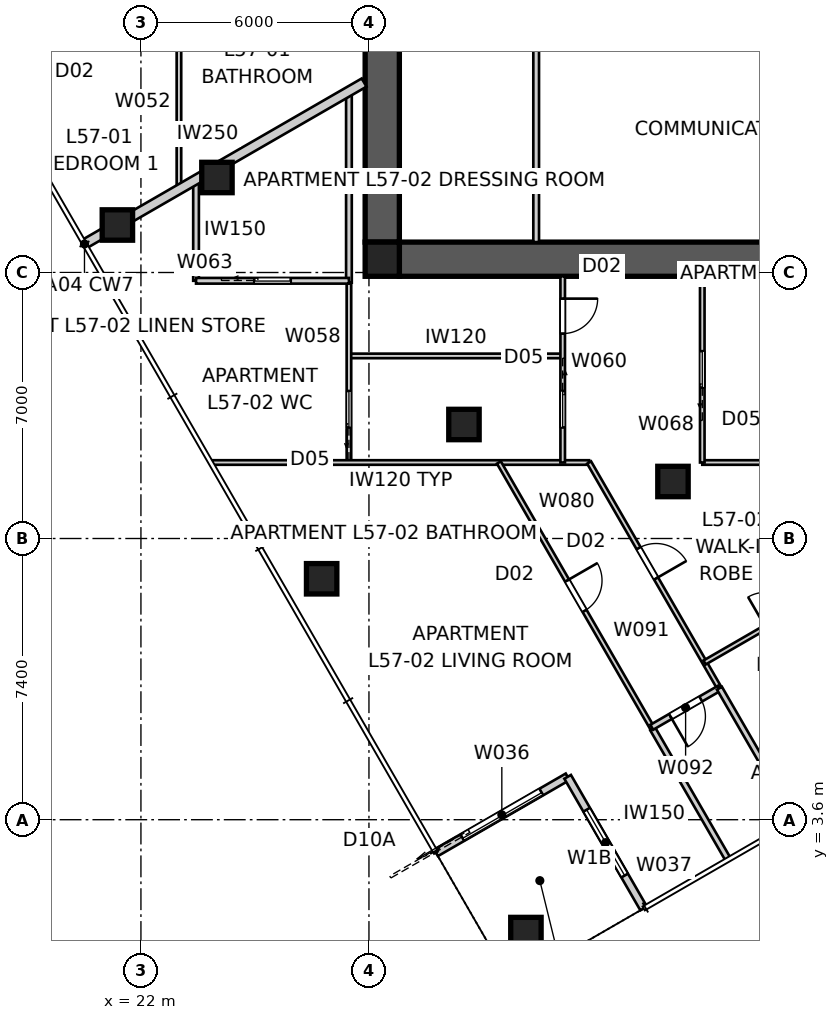
"""IFC4 building model, lengths in metres.
Left out: names, types, materials, properties, quantities, classifications, styles, units other than length and angle.
Written with IfcOpenShell. Run it as: python <this file> out.ifc"""

import sys

from ifc_helpers import new_model, si_unit, direction, frame, frame_2d, origin, origin_2d, place, context, subcontext, project, spatial, polyline, rectangle, outline, extrude, element, fill, save


model = new_model("IFC4")
c1 = context("Model", 3, precision=1e-05, world=origin(), true_north=direction((0.0, 1.0)))
c2 = subcontext(c1, "Body", "Model", "MODEL_VIEW")
j1 = project(units=[si_unit("LENGTHUNIT", "METRE"), si_unit("PLANEANGLEUNIT", "RADIAN")], contexts=[c1])
p1 = place(None, origin())
s1 = spatial("IfcSite", under=j1, at=p1, CompositionType="ELEMENT")
p2 = place(p1, origin())
s2 = spatial("IfcBuilding", under=s1, at=p2, CompositionType="ELEMENT")
p3 = place(p2, frame((0.0, 0.0, 208.2)))
s3 = spatial("IfcBuildingStorey", under=s2, at=p3, CompositionType="ELEMENT", Elevation=208.2)
p4 = place(p3, frame((51.2, 18.35, 0.0), z_axis=(0.0, 0.0, 1.0), x_axis=(-1.0, 0.0, 0.0)))
e1 = element("IfcWall", 1, at=p4, inside=s3, PredefinedType="SHEAR", context=c2, shape_type="SweptSolid", body=[
    extrude(outline(polyline([(0.0, -0.45), (22.4, -0.45), (22.4, -0.025), (22.85, -0.025), (22.85, 0.025), (22.4, 0.025), (22.4, 0.45), (0.0, 0.45), (0.0, 0.025), (-0.45, 0.025), (-0.45, -0.025), (0.0, -0.025), (0.0, -0.45)])), origin(), (0.0, 0.0, 1.0), 3.4),
])
p5 = place(p3, frame((28.35, 41.2, 0.0), z_axis=(0.0, 0.0, 1.0), x_axis=(0.0, -1.0, 0.0)))
e2 = element("IfcWall", 2, at=p5, inside=s3, PredefinedType="SHEAR", context=c2, shape_type="SweptSolid", body=[
    extrude(outline(polyline([(0.0, -0.45), (22.4, -0.45), (22.4, -0.025), (22.85, -0.025), (22.85, 0.025), (22.4, 0.025), (22.4, 0.45), (0.0, 0.45), (0.0, 0.025), (-0.45, 0.025), (-0.45, -0.025), (0.0, -0.025), (0.0, -0.45)])), origin(), (0.0, 0.0, 1.0), 3.4),
])
p6 = place(p5, frame((11.14, 0.0, 0.0)))
e3 = element("IfcOpeningElement", 3, at=p6, cuts=e2, PredefinedType="OPENING", context=c2, shape_type="SweptSolid", body=[
    extrude(rectangle(XDim=1.02, YDim=2.4, at=frame_2d((0.51, 1.2))), frame((0.0, 0.46, 0.0), z_axis=(0.0, -1.0, 0.0), x_axis=(1.0, 0.0, 0.0)), (0.0, 0.0, 1.0), 0.92),
])
p7 = place(p3, frame((28.35, 18.35, 0.0), z_axis=(0.0, 0.0, 1.0), x_axis=(1.0, 0.0, 0.0)))
e4 = element("IfcColumn", 4, at=p7, inside=s3, PredefinedType="COLUMN", context=c2, shape_type="SweptSolid", body=[
    extrude(rectangle(XDim=0.9, YDim=0.9, at=origin_2d()), origin(), (0.0, 0.0, 1.0), 3.4),
])
for number, where, z_axis, x_axis in (
    (5, (32.13, 0.63, -0.15), (0.0, 0.0, 1.0), (1.0, 0.0, 0.0)),
    (6, (21.38, 19.25, -0.15), (0.0, 0.0, 1.0), (1.0, 0.0, 0.0)),
    (7, (26.755, 9.94, -0.15), (0.0, 0.0, 1.0), (1.0, 0.0, 0.0)),
):
    element("IfcColumn", number, at=place(p3, frame(where, z_axis=z_axis, x_axis=x_axis)), inside=s3, PredefinedType="COLUMN", context=c2, shape_type="SweptSolid", body=[
        extrude(rectangle(XDim=0.8, YDim=0.8, at=origin_2d()), origin(), (0.0, 0.0, 1.0), 3.55),
    ])
for number, where, z_axis, x_axis in (
    (8, (24.0, 20.5, 0.0), (0.0, 0.0, 1.0), (1.0, 0.0, 0.0)),
    (9, (30.5, 14.0, 0.0), (0.0, 0.0, 1.0), (1.0, 0.0, 0.0)),
    (10, (36.0, 12.5, 0.0), (0.0, 0.0, 1.0), (1.0, 0.0, 0.0)),
):
    element("IfcColumn", number, at=place(p3, frame(where, z_axis=z_axis, x_axis=x_axis)), inside=s3, PredefinedType="COLUMN", context=c2, shape_type="SweptSolid", body=[
        extrude(rectangle(XDim=0.8, YDim=0.8, at=origin_2d()), origin(), (0.0, 0.0, 1.0), 3.4),
    ])
p8 = place(p3, frame((29.764, 2.729, 0.0), z_axis=(0.0, 0.0, 1.0), x_axis=(0.866026010844, 0.49999894854, 0.0)))
e11 = element("IfcWall", 11, at=p8, inside=s3, PredefinedType="SOLIDWALL", context=c2, shape_type="SweptSolid", body=[
    extrude(rectangle(XDim=4.0, YDim=0.2, at=frame_2d((2.0, 0.0))), origin(), (0.0, 0.0, 1.0), 3.25),
])
p9 = place(p8, frame((0.8, 0.0, 0.0)))
e12 = element("IfcOpeningElement", 12, at=p9, cuts=e11, PredefinedType="OPENING", context=c2, shape_type="SweptSolid", body=[
    extrude(rectangle(XDim=2.4, YDim=2.1, at=frame_2d((1.2, 1.05))), frame((0.0, 0.11, 0.0), z_axis=(0.0, -1.0, 0.0), x_axis=(1.0, 0.0, 0.0)), (0.0, 0.0, 1.0), 0.22),
])
p10 = place(p3, frame((33.229, 4.729, 0.0), z_axis=(0.0, 0.0, 1.0), x_axis=(0.49999894854, -0.866026010844, 0.0)))
e13 = element("IfcWall", 13, at=p10, inside=s3, PredefinedType="SOLIDWALL", context=c2, shape_type="SweptSolid", body=[
    extrude(rectangle(XDim=4.0, YDim=0.2, at=frame_2d((2.0, 0.0))), origin(), (0.0, 0.0, 1.0), 3.25),
])
p11 = place(p10, frame((1.0, 0.0, 0.45)))
e14 = element("IfcOpeningElement", 14, at=p11, cuts=e13, PredefinedType="OPENING", context=c2, shape_type="SweptSolid", body=[
    extrude(rectangle(XDim=2.0, YDim=1.8, at=frame_2d((1.0, 0.9))), frame((0.0, 0.11, 0.0), z_axis=(0.0, -1.0, 0.0), x_axis=(1.0, 0.0, 0.0)), (0.0, 0.0, 1.0), 0.22),
])
p12 = place(p3, frame((20.514, 18.75, 0.0), z_axis=(0.0, 0.0, 1.0), x_axis=(0.866020489494, 0.500008511703, 0.0)))
e15 = element("IfcWall", 15, at=p12, inside=s3, PredefinedType="PARTITIONING", context=c2, shape_type="SweptSolid", body=[
    extrude(rectangle(XDim=8.496, YDim=0.25, at=frame_2d((4.248, 0.0))), origin(), (0.0, 0.0, 1.0), 3.25),
])
p13 = place(p3, frame((32.4, 18.8, 0.0), z_axis=(0.0, 0.0, 1.0), x_axis=(0.0, 1.0, 0.0)))
e16 = element("IfcWall", 16, at=p13, inside=s3, PredefinedType="SOLIDWALL", context=c2, shape_type="SweptSolid", body=[
    extrude(rectangle(XDim=5.9, YDim=0.15, at=frame_2d((2.95, 0.0))), origin(), (0.0, 0.0, 1.0), 3.25),
])
p14 = place(p3, frame((23.0, 20.185, 0.0), z_axis=(0.0, 0.0, 1.0), x_axis=(0.0, 1.0, 0.0)))
e17 = element("IfcWall", 17, at=p14, inside=s3, PredefinedType="PARTITIONING", context=c2, shape_type="SweptSolid", body=[
    extrude(rectangle(XDim=17.18, YDim=0.12, at=frame_2d((8.59, 0.0))), origin(), (0.0, 0.0, 1.0), 2.55),
])
p15 = place(p14, frame((7.688, 0.0, 0.0)))
e18 = element("IfcOpeningElement", 18, at=p15, cuts=e17, PredefinedType="OPENING", context=c2, shape_type="SweptSolid", body=[
    extrude(rectangle(XDim=0.92, YDim=2.34, at=frame_2d((0.46, 1.17))), frame((0.0, 0.07, 0.0), z_axis=(0.0, -1.0, 0.0), x_axis=(1.0, 0.0, 0.0)), (0.0, 0.0, 1.0), 0.14),
])
p16 = place(p14, frame((14.371, 0.0, 0.0)))
e19 = element("IfcOpeningElement", 19, at=p16, cuts=e17, PredefinedType="OPENING", context=c2, shape_type="SweptSolid", body=[
    extrude(rectangle(XDim=0.92, YDim=2.34, at=frame_2d((0.46, 1.17))), frame((0.0, 0.07, 0.0), z_axis=(0.0, -1.0, 0.0), x_axis=(1.0, 0.0, 0.0)), (0.0, 0.0, 1.0), 0.14),
])
p17 = place(p3, frame((22.775, 25.915, 0.0), z_axis=(0.0, 0.0, 1.0), x_axis=(-0.866019274569, -0.500010615962, 0.0)))
e20 = element("IfcWall", 20, at=p17, inside=s3, PredefinedType="PARTITIONING", context=c2, shape_type="SweptSolid", body=[
    extrude(rectangle(XDim=5.5, YDim=0.12, at=frame_2d((2.75, 0.0))), origin(), (0.0, 0.0, 1.0), 3.25),
])
p18 = place(p17, frame((2.31, 0.0, 0.0)))
e21 = element("IfcOpeningElement", 21, at=p18, cuts=e20, PredefinedType="OPENING", context=c2, shape_type="SweptSolid", body=[
    extrude(rectangle(XDim=0.92, YDim=2.34, at=frame_2d((0.46, 1.17))), frame((0.0, 0.07, 0.0), z_axis=(0.0, -1.0, 0.0), x_axis=(1.0, 0.0, 0.0)), (0.0, 0.0, 1.0), 0.14),
])
p19 = place(p3, frame((27.473, 15.805, 0.0), z_axis=(0.0, 0.0, 1.0), x_axis=(1.0, 0.0, 0.0)))
e22 = element("IfcWall", 22, at=p19, inside=s3, PredefinedType="PARTITIONING", context=c2, shape_type="SweptSolid", body=[
    extrude(rectangle(XDim=5.625, YDim=0.12, at=frame_2d((2.812, 0.0))), origin(), (0.0, 0.0, 1.0), 3.25),
])
p20 = place(p3, frame((27.473, 13.0, 0.0), z_axis=(0.0, 0.0, 1.0), x_axis=(0.0, 1.0, 0.0)))
e23 = element("IfcWall", 23, at=p20, inside=s3, PredefinedType="PARTITIONING", context=c2, shape_type="SweptSolid", body=[
    extrude(rectangle(XDim=4.732, YDim=0.12, at=frame_2d((2.366, 0.0))), origin(), (0.0, 0.0, 1.0), 3.25),
])
p21 = place(p20, frame((0.922, 0.0, 0.0)))
e24 = element("IfcOpeningElement", 24, at=p21, cuts=e23, PredefinedType="OPENING", context=c2, shape_type="SweptSolid", body=[
    extrude(rectangle(XDim=0.96, YDim=2.1, at=frame_2d((0.48, 1.05))), frame((0.0, 0.07, 0.0), z_axis=(0.0, -1.0, 0.0), x_axis=(1.0, 0.0, 0.0)), (0.0, 0.0, 1.0), 0.14),
])
p22 = place(p3, frame((33.793, 13.0, 0.0), z_axis=(0.0, 0.0, 1.0), x_axis=(-1.0, 0.0, 0.0)))
e25 = element("IfcWall", 25, at=p22, inside=s3, PredefinedType="PARTITIONING", context=c2, shape_type="SweptSolid", body=[
    extrude(rectangle(XDim=9.913, YDim=0.12, at=frame_2d((4.957, 0.0))), origin(), (0.0, 0.0, 1.0), 3.25),
])
p23 = place(p3, frame((33.098, 17.9, 0.0), z_axis=(0.0, 0.0, 1.0), x_axis=(0.0, -1.0, 0.0)))
e26 = element("IfcWall", 26, at=p23, inside=s3, PredefinedType="PARTITIONING", context=c2, shape_type="SweptSolid", body=[
    extrude(rectangle(XDim=4.9, YDim=0.12, at=frame_2d((2.45, 0.0))), origin(), (0.0, 0.0, 1.0), 3.25),
])
p24 = place(p23, frame((3.018, 0.0, 0.0)))
e27 = element("IfcOpeningElement", 27, at=p24, cuts=e26, PredefinedType="OPENING", context=c2, shape_type="SweptSolid", body=[
    extrude(rectangle(XDim=0.96, YDim=2.1, at=frame_2d((0.48, 1.05))), frame((0.0, 0.07, 0.0), z_axis=(0.0, -1.0, 0.0), x_axis=(1.0, 0.0, 0.0)), (0.0, 0.0, 1.0), 0.14),
])
p25 = place(p23, frame((0.588, 0.0, 0.0)))
e28 = element("IfcOpeningElement", 28, at=p25, cuts=e26, PredefinedType="OPENING", context=c2, shape_type="SweptSolid", body=[
    extrude(rectangle(XDim=0.92, YDim=2.34, at=frame_2d((0.46, 1.17))), frame((0.0, 0.07, 0.0), z_axis=(0.0, -1.0, 0.0), x_axis=(1.0, 0.0, 0.0)), (0.0, 0.0, 1.0), 0.14),
])
p26 = place(p3, frame((27.473, 17.732, 0.0), z_axis=(0.0, 0.0, 1.0), x_axis=(0.0, 1.0, 0.0)))
e29 = element("IfcWall", 29, at=p26, inside=s3, PredefinedType="SOLIDWALL", context=c2, shape_type="SweptSolid", body=[
    extrude(rectangle(XDim=5.035, YDim=0.15, at=frame_2d((2.518, 0.0))), origin(), (0.0, 0.0, 1.0), 3.25),
])
p27 = place(p3, frame((23.45, 20.445, 0.0), z_axis=(0.0, 0.0, 1.0), x_axis=(0.0, -1.0, 0.0)))
e30 = element("IfcWall", 30, at=p27, inside=s3, PredefinedType="SOLIDWALL", context=c2, shape_type="SweptSolid", body=[
    extrude(rectangle(XDim=2.663, YDim=0.15, at=frame_2d((1.331, 0.0))), origin(), (0.0, 0.0, 1.0), 3.25),
])
p28 = place(p3, frame((23.45, 17.782, 0.0), z_axis=(0.0, 0.0, 1.0), x_axis=(1.0, 0.0, 0.0)))
e31 = element("IfcWall", 31, at=p28, inside=s3, PredefinedType="SOLIDWALL", context=c2, shape_type="SweptSolid", body=[
    extrude(rectangle(XDim=4.023, YDim=0.15, at=frame_2d((2.012, 0.0))), origin(), (0.0, 0.0, 1.0), 3.25),
])
p29 = place(p28, frame((1.532, 0.0, 0.0)))
e32 = element("IfcOpeningElement", 32, at=p29, cuts=e31, PredefinedType="OPENING", context=c2, shape_type="SweptSolid", body=[
    extrude(rectangle(XDim=0.96, YDim=2.1, at=frame_2d((0.48, 1.05))), frame((0.0, 0.085, 0.0), z_axis=(0.0, -1.0, 0.0), x_axis=(1.0, 0.0, 0.0)), (0.0, 0.0, 1.0), 0.17),
])
p30 = place(p3, frame((39.192, 13.0, 0.0), z_axis=(0.0, 0.0, 1.0), x_axis=(-1.0, 0.0, 0.0)))
e33 = element("IfcWall", 33, at=p30, inside=s3, PredefinedType="PARTITIONING", context=c2, shape_type="SweptSolid", body=[
    extrude(rectangle(XDim=2.421, YDim=0.12, at=frame_2d((1.21, 0.0))), origin(), (0.0, 0.0, 1.0), 3.25),
])
p31 = place(p3, frame((36.771, 13.0, 0.0), z_axis=(0.0, 0.0, 1.0), x_axis=(0.0, 1.0, 0.0)))
e34 = element("IfcWall", 34, at=p31, inside=s3, PredefinedType="PARTITIONING", context=c2, shape_type="SweptSolid", body=[
    extrude(rectangle(XDim=4.9, YDim=0.12, at=frame_2d((2.45, 0.0))), origin(), (0.0, 0.0, 1.0), 3.25),
])
p32 = place(p31, frame((1.97, 0.0, 0.0)))
e35 = element("IfcOpeningElement", 35, at=p32, cuts=e34, PredefinedType="OPENING", context=c2, shape_type="SweptSolid", body=[
    extrude(rectangle(XDim=0.96, YDim=2.1, at=frame_2d((0.48, 1.05))), frame((0.0, 0.07, 0.0), z_axis=(0.0, -1.0, 0.0), x_axis=(1.0, 0.0, 0.0)), (0.0, 0.0, 1.0), 0.14),
])
p33 = place(p3, frame((31.419, 13.0, 0.0), z_axis=(0.0, 0.0, 1.0), x_axis=(0.49999569496, -0.866027889286, 0.0)))
e36 = element("IfcWall", 36, at=p33, inside=s3, PredefinedType="PARTITIONING", context=c2, shape_type="SweptSolid", body=[
    extrude(rectangle(XDim=8.095, YDim=0.12, at=frame_2d((4.048, 0.0))), origin(), (0.0, 0.0, 1.0), 3.25),
])
p34 = place(p33, frame((3.588, 0.0, 0.0)))
e37 = element("IfcOpeningElement", 37, at=p34, cuts=e36, PredefinedType="OPENING", context=c2, shape_type="SweptSolid", body=[
    extrude(rectangle(XDim=0.92, YDim=2.34, at=frame_2d((0.46, 1.17))), frame((0.0, 0.07, 0.0), z_axis=(0.0, -1.0, 0.0), x_axis=(1.0, 0.0, 0.0)), (0.0, 0.0, 1.0), 0.14),
])
p35 = place(p3, frame((35.467, 5.989, 0.0), z_axis=(0.0, 0.0, 1.0), x_axis=(0.499998311937, -0.866026378386, 0.0)))
e38 = element("IfcWall", 38, at=p35, inside=s3, PredefinedType="SOLIDWALL", context=c2, shape_type="SweptSolid", body=[
    extrude(rectangle(XDim=3.933, YDim=0.15, at=frame_2d((1.966, 0.0))), origin(), (0.0, 0.0, 1.0), 3.25),
])
p36 = place(p3, frame((33.793, 13.0, 0.0), z_axis=(0.0, 0.0, 1.0), x_axis=(0.500005944398, -0.866021971758, 0.0)))
e39 = element("IfcWall", 39, at=p36, inside=s3, PredefinedType="PARTITIONING", context=c2, shape_type="SweptSolid", body=[
    extrude(rectangle(XDim=6.858, YDim=0.12, at=frame_2d((3.429, 0.0))), origin(), (0.0, 0.0, 1.0), 3.25),
])
p37 = place(p36, frame((2.604, 0.0, 0.0)))
e40 = element("IfcOpeningElement", 40, at=p37, cuts=e39, PredefinedType="OPENING", context=c2, shape_type="SweptSolid", body=[
    extrude(rectangle(XDim=0.92, YDim=2.34, at=frame_2d((0.46, 1.17))), frame((0.0, 0.07, 0.0), z_axis=(0.0, -1.0, 0.0), x_axis=(1.0, 0.0, 0.0)), (0.0, 0.0, 1.0), 0.14),
])
p38 = place(p3, frame((37.223, 7.061, 0.0), z_axis=(0.0, 0.0, 1.0), x_axis=(-0.866086729251, -0.499893766129, 0.0)))
e41 = element("IfcWall", 41, at=p38, inside=s3, PredefinedType="SOLIDWALL", context=c2, shape_type="SweptSolid", body=[
    extrude(rectangle(XDim=2.056, YDim=0.15, at=frame_2d((1.028, 0.0))), origin(), (0.0, 0.0, 1.0), 3.25),
])
p39 = place(p38, frame((0.568, 0.0, 0.0)))
e42 = element("IfcOpeningElement", 42, at=p39, cuts=e41, PredefinedType="OPENING", context=c2, shape_type="SweptSolid", body=[
    extrude(rectangle(XDim=0.92, YDim=2.34, at=frame_2d((0.46, 1.17))), frame((0.0, 0.085, 0.0), z_axis=(0.0, -1.0, 0.0), x_axis=(1.0, 0.0, 0.0)), (0.0, 0.0, 1.0), 0.17),
])
p40 = place(p3, frame((36.832, 7.737, 0.0), z_axis=(0.0, 0.0, 1.0), x_axis=(0.866014397438, 0.500019063067, 0.0)))
e43 = element("IfcWall", 43, at=p40, inside=s3, PredefinedType="PARTITIONING", context=c2, shape_type="SweptSolid", body=[
    extrude(rectangle(XDim=5.035, YDim=0.12, at=frame_2d((2.518, 0.0))), origin(), (0.0, 0.0, 1.0), 3.25),
])
p41 = place(p40, frame((1.853, 0.0, 0.0)))
e44 = element("IfcOpeningElement", 44, at=p41, cuts=e43, PredefinedType="OPENING", context=c2, shape_type="SweptSolid", body=[
    extrude(rectangle(XDim=0.92, YDim=2.34, at=frame_2d((0.46, 1.17))), frame((0.0, 0.07, 0.0), z_axis=(0.0, -1.0, 0.0), x_axis=(1.0, 0.0, 0.0)), (0.0, 0.0, 1.0), 0.14),
])
p42 = place(p3, frame((39.214, 3.612, 0.0), z_axis=(0.0, 0.0, 1.0), x_axis=(-0.499989551455, 0.866031436171, 0.0)))
e45 = element("IfcWall", 45, at=p42, inside=s3, PredefinedType="SOLIDWALL", context=c2, shape_type="SweptSolid", body=[
    extrude(rectangle(XDim=3.982, YDim=0.15, at=frame_2d((1.991, 0.0))), origin(), (0.0, 0.0, 1.0), 3.25),
])
p43 = place(p9, origin())
e46 = element("IfcDoor", 46, at=p43, inside=s3, OperationType="SLIDING_TO_LEFT", PredefinedType="DOOR", context=c2, shape_type="SweptSolid", body=[
    extrude(rectangle(XDim=2.4, YDim=2.1, at=frame_2d((1.2, 1.05))), frame((0.0, 0.025, 0.0), z_axis=(0.0, -1.0, 0.0), x_axis=(1.0, 0.0, 0.0)), (0.0, 0.0, 1.0), 0.05),
])
fill(e12, e46)
p44 = place(p11, origin())
e47 = element("IfcWindow", 47, at=p44, inside=s3, PartitioningType="SINGLE_PANEL", PredefinedType="WINDOW", context=c2, shape_type="SweptSolid", body=[
    extrude(rectangle(XDim=2.0, YDim=1.8, at=frame_2d((1.0, 0.9))), frame((0.0, 0.03, 0.0), z_axis=(0.0, -1.0, 0.0), x_axis=(1.0, 0.0, 0.0)), (0.0, 0.0, 1.0), 0.06),
])
fill(e14, e47)
p45 = place(p32, origin())
e48 = element("IfcDoor", 48, at=p45, inside=s3, OperationType="SLIDING_TO_LEFT", PredefinedType="DOOR", context=c2, shape_type="SweptSolid", body=[
    extrude(rectangle(XDim=0.96, YDim=2.1, at=frame_2d((0.48, 1.05))), frame((0.0, 0.025, 0.0), z_axis=(0.0, -1.0, 0.0), x_axis=(1.0, 0.0, 0.0)), (0.0, 0.0, 1.0), 0.05),
])
fill(e35, e48)
p46 = place(p37, origin())
e49 = element("IfcDoor", 49, at=p46, inside=s3, OperationType="SINGLE_SWING_RIGHT", PredefinedType="DOOR", context=c2, shape_type="SweptSolid", body=[
    extrude(rectangle(XDim=0.92, YDim=2.34, at=frame_2d((0.46, 1.17))), frame((0.0, 0.025, 0.0), z_axis=(0.0, -1.0, 0.0), x_axis=(1.0, 0.0, 0.0)), (0.0, 0.0, 1.0), 0.05),
])
fill(e40, e49)
p47 = place(p24, origin())
e50 = element("IfcDoor", 50, at=p47, inside=s3, OperationType="SLIDING_TO_LEFT", PredefinedType="DOOR", context=c2, shape_type="SweptSolid", body=[
    extrude(rectangle(XDim=0.96, YDim=2.1, at=frame_2d((0.48, 1.05))), frame((0.0, 0.025, 0.0), z_axis=(0.0, -1.0, 0.0), x_axis=(1.0, 0.0, 0.0)), (0.0, 0.0, 1.0), 0.05),
])
fill(e27, e50)
p48 = place(p25, origin())
e51 = element("IfcDoor", 51, at=p48, inside=s3, OperationType="SINGLE_SWING_LEFT", PredefinedType="DOOR", context=c2, shape_type="SweptSolid", body=[
    extrude(rectangle(XDim=0.92, YDim=2.34, at=frame_2d((0.46, 1.17))), frame((0.0, 0.025, 0.0), z_axis=(0.0, -1.0, 0.0), x_axis=(1.0, 0.0, 0.0)), (0.0, 0.0, 1.0), 0.05),
])
fill(e28, e51)
p49 = place(p34, origin())
e52 = element("IfcDoor", 52, at=p49, inside=s3, OperationType="SINGLE_SWING_LEFT", PredefinedType="DOOR", context=c2, shape_type="SweptSolid", body=[
    extrude(rectangle(XDim=0.92, YDim=2.34, at=frame_2d((0.46, 1.17))), frame((0.0, 0.025, 0.0), z_axis=(0.0, -1.0, 0.0), x_axis=(1.0, 0.0, 0.0)), (0.0, 0.0, 1.0), 0.05),
])
fill(e37, e52)
p50 = place(p39, origin())
e53 = element("IfcDoor", 53, at=p50, inside=s3, OperationType="SINGLE_SWING_RIGHT", PredefinedType="DOOR", context=c2, shape_type="SweptSolid", body=[
    extrude(rectangle(XDim=0.92, YDim=2.34, at=frame_2d((0.46, 1.17))), frame((0.0, 0.025, 0.0), z_axis=(0.0, -1.0, 0.0), x_axis=(1.0, 0.0, 0.0)), (0.0, 0.0, 1.0), 0.05),
])
fill(e42, e53)
p51 = place(p21, origin())
e54 = element("IfcDoor", 54, at=p51, inside=s3, OperationType="SLIDING_TO_LEFT", PredefinedType="DOOR", context=c2, shape_type="SweptSolid", body=[
    extrude(rectangle(XDim=0.96, YDim=2.1, at=frame_2d((0.48, 1.05))), frame((0.0, 0.025, 0.0), z_axis=(0.0, -1.0, 0.0), x_axis=(1.0, 0.0, 0.0)), (0.0, 0.0, 1.0), 0.05),
])
fill(e24, e54)
p52 = place(p29, origin())
e55 = element("IfcDoor", 55, at=p52, inside=s3, OperationType="SLIDING_TO_LEFT", PredefinedType="DOOR", context=c2, shape_type="SweptSolid", body=[
    extrude(rectangle(XDim=0.96, YDim=2.1, at=frame_2d((0.48, 1.05))), frame((0.0, 0.025, 0.0), z_axis=(0.0, -1.0, 0.0), x_axis=(1.0, 0.0, 0.0)), (0.0, 0.0, 1.0), 0.05),
])
fill(e32, e55)
save(model, sys.argv[1])
